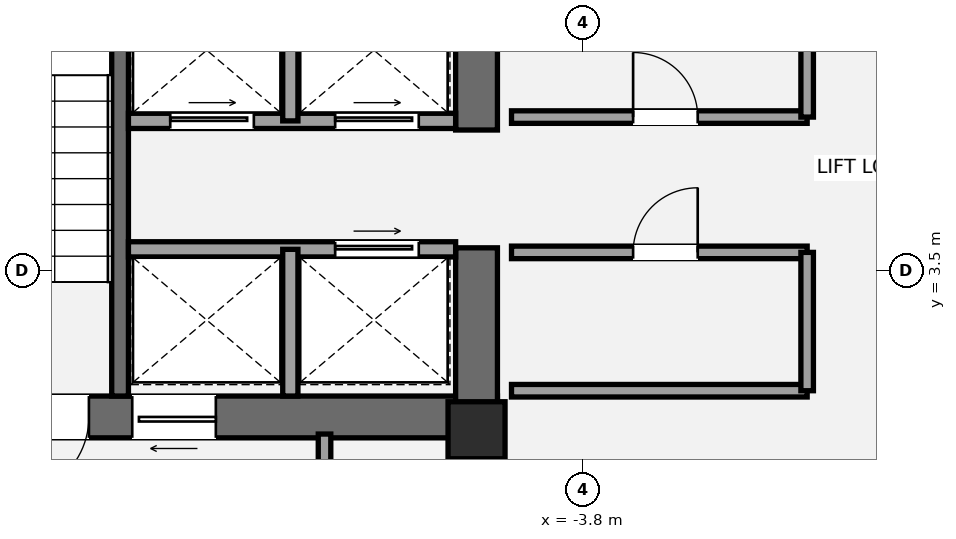
"""IFC4 building model, lengths in metres.
Left out: names, types, materials, properties, quantities, classifications, styles, units other than length and angle.
Written with IfcOpenShell. Run it as: python <this file> out.ifc"""

import sys

from ifc_helpers import new_model, si_unit, direction, frame, frame_2d, origin, origin_2d, place, context, subcontext, project, spatial, rectangle, extrude, element, fill, save


model = new_model("IFC4")
c1 = context("Model", 3, precision=1e-05, world=origin(), true_north=direction((0.0, 1.0)))
c2 = subcontext(c1, "Body", "Model", "MODEL_VIEW")
j1 = project(units=[si_unit("LENGTHUNIT", "METRE"), si_unit("PLANEANGLEUNIT", "RADIAN")], contexts=[c1])
p1 = place(None, origin())
s1 = spatial("IfcSite", under=j1, at=p1, CompositionType="ELEMENT")
p2 = place(p1, origin())
s2 = spatial("IfcBuilding", under=s1, at=p2, CompositionType="ELEMENT")
p3 = place(p2, frame((0.0, 0.0, 232.05)))
s3 = spatial("IfcBuildingStorey", under=s2, at=p3, CompositionType="ELEMENT", Elevation=232.05)
p4 = place(p3, frame((-4.925, 1.575, 0.0), z_axis=(0.0, 0.0, 1.0), x_axis=(-1.0, 0.0, 0.0)))
e1 = element("IfcWall", 1, at=p4, inside=s3, PredefinedType="SHEAR", context=c2, shape_type="SweptSolid", body=[
    extrude(rectangle(XDim=8.775, YDim=0.55, at=frame_2d((4.387, 0.0))), origin(), (0.0, 0.0, 1.0), 3.15),
])
p5 = place(p4, frame((5.375, 0.0, 0.0)))
e2 = element("IfcOpeningElement", 2, at=p5, cuts=e1, PredefinedType="OPENING", context=c2, shape_type="SweptSolid", body=[
    extrude(rectangle(XDim=1.05, YDim=2.15, at=frame_2d((0.525, 1.075))), frame((0.0, 0.285, 0.0), z_axis=(0.0, -1.0, 0.0), x_axis=(1.0, 0.0, 0.0)), (0.0, 0.0, 1.0), 0.57),
])
p6 = place(p4, frame((3.705, 0.0, 0.0)))
e3 = element("IfcOpeningElement", 3, at=p6, cuts=e1, PredefinedType="OPENING", context=c2, shape_type="SweptSolid", body=[
    extrude(rectangle(XDim=1.1, YDim=2.2, at=frame_2d((0.55, 1.1))), frame((0.0, 0.285, 0.0), z_axis=(0.0, -1.0, 0.0), x_axis=(1.0, 0.0, 0.0)), (0.0, 0.0, 1.0), 0.57),
])
p7 = place(p3, frame((-5.2, 1.3, 0.0), z_axis=(0.0, 0.0, 1.0), x_axis=(0.0, 1.0, 0.0)))
e4 = element("IfcWall", 4, at=p7, inside=s3, PredefinedType="SHEAR", context=c2, shape_type="SweptSolid", body=[
    extrude(rectangle(XDim=2.5, YDim=0.55, at=frame_2d((1.25, 0.0))), origin(), (0.0, 0.0, 1.0), 3.15),
])
p8 = place(p3, frame((-5.2, 5.35, 0.0), z_axis=(0.0, 0.0, 1.0), x_axis=(0.0, 1.0, 0.0)))
e5 = element("IfcWall", 5, at=p8, inside=s3, PredefinedType="SHEAR", context=c2, shape_type="SweptSolid", body=[
    extrude(rectangle(XDim=2.0, YDim=0.55, at=frame_2d((1.0, 0.0))), origin(), (0.0, 0.0, 1.0), 3.15),
])
p9 = place(p3, frame((-9.89, 1.85, 0.0), z_axis=(0.0, 0.0, 1.0), x_axis=(0.0, 1.0, 0.0)))
e6 = element("IfcWall", 6, at=p9, inside=s3, PredefinedType="SHEAR", context=c2, shape_type="SweptSolid", body=[
    extrude(rectangle(XDim=7.15, YDim=0.22, at=frame_2d((3.575, 0.0))), origin(), (0.0, 0.0, 1.0), 3.15),
])
p10 = place(p3, frame((-5.2, 1.4, 0.0), z_axis=(0.0, 0.0, 1.0), x_axis=(1.0, 0.0, 0.0)))
e7 = element("IfcColumn", 7, at=p10, inside=s3, PredefinedType="PILASTER", context=c2, shape_type="SweptSolid", body=[
    extrude(rectangle(XDim=0.75, YDim=0.75, at=origin_2d()), origin(), (0.0, 0.0, 1.0), 3.15),
])
p11 = place(p3, frame((-7.2, -2.15, 0.0), z_axis=(0.0, 0.0, 1.0), x_axis=(0.0, 1.0, 0.0)))
e8 = element("IfcWall", 8, at=p11, inside=s3, PredefinedType="PARTITIONING", context=c2, shape_type="SweptSolid", body=[
    extrude(rectangle(XDim=3.5, YDim=0.165, at=frame_2d((1.75, 0.0))), origin(), (0.0, 0.0, 1.0), 2.423),
])
p12 = place(p3, frame((-4.95, -2.15, 0.0), z_axis=(0.0, 0.0, 1.0), x_axis=(0.0, 1.0, 0.0)))
e9 = element("IfcWall", 9, at=p12, inside=s3, PredefinedType="SOLIDWALL", context=c2, shape_type="SweptSolid", body=[
    extrude(rectangle(XDim=3.5, YDim=0.2, at=frame_2d((1.75, 0.0))), origin(), (0.0, 0.0, 1.0), 2.423),
])
p13 = place(p12, frame((0.95, 0.0, 0.0)))
e10 = element("IfcOpeningElement", 10, at=p13, cuts=e9, PredefinedType="OPENING", context=c2, shape_type="SweptSolid", body=[
    extrude(rectangle(XDim=0.75, YDim=2.1, at=frame_2d((0.375, 1.05))), frame((0.0, 0.11, 0.0), z_axis=(0.0, -1.0, 0.0), x_axis=(1.0, 0.0, 0.0)), (0.0, 0.0, 1.0), 0.22),
])
p14 = place(p3, frame((-9.78, 3.78, 0.0), z_axis=(0.0, 0.0, 1.0), x_axis=(1.0, 0.0, 0.0)))
e11 = element("IfcWall", 11, at=p14, inside=s3, PredefinedType="SOLIDWALL", context=c2, shape_type="SweptSolid", body=[
    extrude(rectangle(XDim=4.305, YDim=0.2, at=frame_2d((2.152, 0.0))), origin(), (0.0, 0.0, 1.0), 2.97),
])
p15 = place(p14, frame((2.72, 0.0, 0.0)))
e12 = element("IfcOpeningElement", 12, at=p15, cuts=e11, PredefinedType="OPENING", context=c2, shape_type="SweptSolid", body=[
    extrude(rectangle(XDim=1.1, YDim=2.2, at=frame_2d((0.55, 1.1))), frame((0.0, 0.11, 0.0), z_axis=(0.0, -1.0, 0.0), x_axis=(1.0, 0.0, 0.0)), (0.0, 0.0, 1.0), 0.22),
])
p16 = place(p3, frame((-7.65, 1.85, 0.0), z_axis=(0.0, 0.0, 1.0), x_axis=(0.0, 1.0, 0.0)))
e13 = element("IfcWall", 13, at=p16, inside=s3, PredefinedType="SOLIDWALL", context=c2, shape_type="SweptSolid", body=[
    extrude(rectangle(XDim=1.93, YDim=0.2, at=frame_2d((0.965, 0.0))), origin(), (0.0, 0.0, 1.0), 2.97),
])
p17 = place(p3, frame((-9.78, 5.47, 0.0), z_axis=(0.0, 0.0, 1.0), x_axis=(1.0, 0.0, 0.0)))
e14 = element("IfcWall", 14, at=p17, inside=s3, PredefinedType="SOLIDWALL", context=c2, shape_type="SweptSolid", body=[
    extrude(rectangle(XDim=4.305, YDim=0.2, at=frame_2d((2.152, 0.0))), origin(), (0.0, 0.0, 1.0), 2.97),
])
p18 = place(p17, frame((0.55, 0.0, 0.0)))
e15 = element("IfcOpeningElement", 15, at=p18, cuts=e14, PredefinedType="OPENING", context=c2, shape_type="SweptSolid", body=[
    extrude(rectangle(XDim=1.1, YDim=2.2, at=frame_2d((0.55, 1.1))), frame((0.0, 0.11, 0.0), z_axis=(0.0, -1.0, 0.0), x_axis=(1.0, 0.0, 0.0)), (0.0, 0.0, 1.0), 0.22),
])
p19 = place(p17, frame((2.72, 0.0, 0.0)))
e16 = element("IfcOpeningElement", 16, at=p19, cuts=e14, PredefinedType="OPENING", context=c2, shape_type="SweptSolid", body=[
    extrude(rectangle(XDim=1.1, YDim=2.2, at=frame_2d((0.55, 1.1))), frame((0.0, 0.11, 0.0), z_axis=(0.0, -1.0, 0.0), x_axis=(1.0, 0.0, 0.0)), (0.0, 0.0, 1.0), 0.22),
])
p20 = place(p3, frame((-7.65, 5.47, 0.0), z_axis=(0.0, 0.0, 1.0), x_axis=(0.0, 1.0, 0.0)))
e17 = element("IfcWall", 17, at=p20, inside=s3, PredefinedType="SOLIDWALL", context=c2, shape_type="SweptSolid", body=[
    extrude(rectangle(XDim=1.86, YDim=0.2, at=frame_2d((0.93, 0.0))), origin(), (0.0, 0.0, 1.0), 2.97),
])
p21 = place(p3, frame((-4.74, 1.92, 0.0), z_axis=(0.0, 0.0, 1.0), x_axis=(1.0, 0.0, 0.0)))
e18 = element("IfcWall", 18, at=p21, inside=s3, PredefinedType="PARTITIONING", context=c2, shape_type="SweptSolid", body=[
    extrude(rectangle(XDim=3.89, YDim=0.165, at=frame_2d((1.945, 0.0))), origin(), (0.0, 0.0, 1.0), 2.11),
])
p22 = place(p3, frame((-4.74, 3.74, 0.0), z_axis=(0.0, 0.0, 1.0), x_axis=(1.0, 0.0, 0.0)))
e19 = element("IfcWall", 19, at=p22, inside=s3, PredefinedType="PARTITIONING", context=c2, shape_type="SweptSolid", body=[
    extrude(rectangle(XDim=3.89, YDim=0.165, at=frame_2d((1.945, 0.0))), origin(), (0.0, 0.0, 1.0), 2.97),
])
p23 = place(p22, frame((1.6, 0.0, 0.0)))
e20 = element("IfcOpeningElement", 20, at=p23, cuts=e19, PredefinedType="OPENING", context=c2, shape_type="SweptSolid", body=[
    extrude(rectangle(XDim=0.85, YDim=2.1, at=frame_2d((0.425, 1.05))), frame((0.0, 0.093, 0.0), z_axis=(0.0, -1.0, 0.0), x_axis=(1.0, 0.0, 0.0)), (0.0, 0.0, 1.0), 0.185),
])
p24 = place(p3, frame((-0.85, 1.92, 0.0), z_axis=(0.0, 0.0, 1.0), x_axis=(0.0, 1.0, 0.0)))
e21 = element("IfcWall", 21, at=p24, inside=s3, PredefinedType="PARTITIONING", context=c2, shape_type="SweptSolid", body=[
    extrude(rectangle(XDim=1.82, YDim=0.165, at=frame_2d((0.91, 0.0))), origin(), (0.0, 0.0, 1.0), 2.97),
])
p25 = place(p3, frame((-4.74, 5.52, 0.0), z_axis=(0.0, 0.0, 1.0), x_axis=(1.0, 0.0, 0.0)))
e22 = element("IfcWall", 22, at=p25, inside=s3, PredefinedType="PARTITIONING", context=c2, shape_type="SweptSolid", body=[
    extrude(rectangle(XDim=3.89, YDim=0.165, at=frame_2d((1.945, 0.0))), origin(), (0.0, 0.0, 1.0), 2.97),
])
p26 = place(p25, frame((1.6, 0.0, 0.0)))
e23 = element("IfcOpeningElement", 23, at=p26, cuts=e22, PredefinedType="OPENING", context=c2, shape_type="SweptSolid", body=[
    extrude(rectangle(XDim=0.85, YDim=2.1, at=frame_2d((0.425, 1.05))), frame((0.0, 0.093, 0.0), z_axis=(0.0, -1.0, 0.0), x_axis=(1.0, 0.0, 0.0)), (0.0, 0.0, 1.0), 0.185),
])
p27 = place(p3, frame((-0.85, 5.52, 0.0), z_axis=(0.0, 0.0, 1.0), x_axis=(0.0, 1.0, 0.0)))
e24 = element("IfcWall", 24, at=p27, inside=s3, PredefinedType="PARTITIONING", context=c2, shape_type="SweptSolid", body=[
    extrude(rectangle(XDim=1.81, YDim=0.165, at=frame_2d((0.905, 0.0))), origin(), (0.0, 0.0, 1.0), 2.97),
])
p28 = place(p5, origin())
e25 = element("IfcDoor", 25, at=p28, inside=s3, OperationType="SINGLE_SWING_RIGHT", PredefinedType="DOOR", context=c2, shape_type="SweptSolid", body=[
    extrude(rectangle(XDim=1.05, YDim=2.15, at=frame_2d((0.525, 1.075))), frame((0.0, 0.025, 0.0), z_axis=(0.0, -1.0, 0.0), x_axis=(1.0, 0.0, 0.0)), (0.0, 0.0, 1.0), 0.05),
])
fill(e2, e25)
p29 = place(p6, origin())
e26 = element("IfcDoor", 26, at=p29, inside=s3, OperationType="SLIDING_TO_LEFT", PredefinedType="DOOR", context=c2, shape_type="SweptSolid", body=[
    extrude(rectangle(XDim=1.1, YDim=2.2, at=frame_2d((0.55, 1.1))), frame((0.0, 0.025, 0.0), z_axis=(0.0, -1.0, 0.0), x_axis=(1.0, 0.0, 0.0)), (0.0, 0.0, 1.0), 0.05),
])
fill(e3, e26)
p30 = place(p18, origin())
e27 = element("IfcDoor", 27, at=p30, inside=s3, OperationType="SLIDING_TO_LEFT", PredefinedType="DOOR", context=c2, shape_type="SweptSolid", body=[
    extrude(rectangle(XDim=1.1, YDim=2.2, at=frame_2d((0.55, 1.1))), frame((0.0, 0.025, 0.0), z_axis=(0.0, -1.0, 0.0), x_axis=(1.0, 0.0, 0.0)), (0.0, 0.0, 1.0), 0.05),
])
fill(e15, e27)
p31 = place(p19, origin())
e28 = element("IfcDoor", 28, at=p31, inside=s3, OperationType="SLIDING_TO_LEFT", PredefinedType="DOOR", context=c2, shape_type="SweptSolid", body=[
    extrude(rectangle(XDim=1.1, YDim=2.2, at=frame_2d((0.55, 1.1))), frame((0.0, 0.025, 0.0), z_axis=(0.0, -1.0, 0.0), x_axis=(1.0, 0.0, 0.0)), (0.0, 0.0, 1.0), 0.05),
])
fill(e16, e28)
p32 = place(p15, origin())
e29 = element("IfcDoor", 29, at=p32, inside=s3, OperationType="SLIDING_TO_LEFT", PredefinedType="DOOR", context=c2, shape_type="SweptSolid", body=[
    extrude(rectangle(XDim=1.1, YDim=2.2, at=frame_2d((0.55, 1.1))), frame((0.0, 0.025, 0.0), z_axis=(0.0, -1.0, 0.0), x_axis=(1.0, 0.0, 0.0)), (0.0, 0.0, 1.0), 0.05),
])
fill(e12, e29)
p33 = place(p23, origin())
e30 = element("IfcDoor", 30, at=p33, inside=s3, OperationType="SINGLE_SWING_RIGHT", PredefinedType="DOOR", context=c2, shape_type="SweptSolid", body=[
    extrude(rectangle(XDim=0.85, YDim=2.1, at=frame_2d((0.425, 1.05))), frame((0.0, 0.025, 0.0), z_axis=(0.0, -1.0, 0.0), x_axis=(1.0, 0.0, 0.0)), (0.0, 0.0, 1.0), 0.05),
])
fill(e20, e30)
p34 = place(p26, origin())
e31 = element("IfcDoor", 31, at=p34, inside=s3, OperationType="SINGLE_SWING_LEFT", PredefinedType="DOOR", context=c2, shape_type="SweptSolid", body=[
    extrude(rectangle(XDim=0.85, YDim=2.1, at=frame_2d((0.425, 1.05))), frame((0.0, 0.025, 0.0), z_axis=(0.0, -1.0, 0.0), x_axis=(1.0, 0.0, 0.0)), (0.0, 0.0, 1.0), 0.05),
])
fill(e23, e31)
save(model, sys.argv[1])
